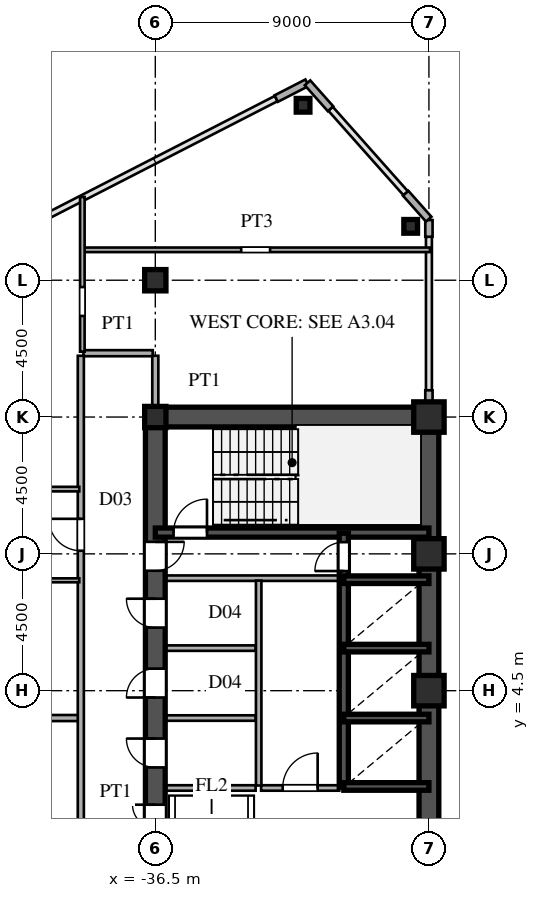
"""IFC4 building model, lengths in metres.
Left out: names, types, materials, properties, quantities, classifications, styles, units other than length and angle.
Written with IfcOpenShell. Run it as: python <this file> out.ifc"""

import sys

from ifc_helpers import new_model, si_unit, direction, frame, frame_2d, origin, origin_2d, place, context, subcontext, project, spatial, rectangle, hollow_rectangle, i_section, extrude, source, transform, mapped, element, fill, save


model = new_model("IFC4")
c1 = context("Model", 3, precision=1e-05, world=origin(), true_north=direction((0.0, 1.0)))
c2 = subcontext(c1, "Body", "Model", "MODEL_VIEW")
j1 = project(units=[si_unit("LENGTHUNIT", "METRE"), si_unit("PLANEANGLEUNIT", "RADIAN")], contexts=[c1])
p1 = place(None, origin())
s1 = spatial("IfcSite", under=j1, at=p1, CompositionType="ELEMENT")
p2 = place(p1, origin())
s2 = spatial("IfcBuilding", under=s1, at=p2, CompositionType="ELEMENT")
p3 = place(p2, frame((0.0, 0.0, 124.8)))
s3 = spatial("IfcBuildingStorey", under=s2, at=p3, CompositionType="ELEMENT", Elevation=124.8)
m1 = source(origin(), c2, "Body", "SweptSolid", [
    extrude(hollow_rectangle(XDim=1.0, YDim=1.0, WallThickness=0.042, at=origin_2d()), origin(), (0.0, 0.0, 1.0), 3.6),
])
for number, where, z_axis, x_axis in (
    (1, (-27.5, 4.5, 0.0), (0.0, 0.0, 1.0), (1.0, 0.0, 0.0)),
    (2, (-27.5, 9.0, 0.0), (0.0, 0.0, 1.0), (1.0, 0.0, 0.0)),
    (3, (-27.5, 13.5, 0.0), (0.0, 0.0, 1.0), (1.0, 0.0, 0.0)),
):
    element("IfcColumn", number, at=place(p3, frame(where, z_axis=z_axis, x_axis=x_axis)), inside=s3, PredefinedType="COLUMN", context=c2, shape_type="MappedRepresentation", body=[
        mapped(m1, transform((0.0, 0.0, 0.0), scale=1.0)),
    ])
m2 = source(origin(), c2, "Body", "SweptSolid", [
    extrude(i_section(OverallWidth=0.7, OverallDepth=0.7, WebThickness=0.028, FlangeThickness=0.045, at=origin_2d()), origin(), (0.0, 0.0, 1.0), 3.6),
])
for number, where, z_axis, x_axis in (
    (4, (-36.5, 13.5, 0.0), (0.0, 0.0, 1.0), (1.0, 0.0, 0.0)),
    (5, (-36.5, 18.0, 0.0), (0.0, 0.0, 1.0), (1.0, 0.0, 0.0)),
):
    element("IfcColumn", number, at=place(p3, frame(where, z_axis=z_axis, x_axis=x_axis)), inside=s3, PredefinedType="COLUMN", context=c2, shape_type="MappedRepresentation", body=[
        mapped(m2, transform((0.0, 0.0, 0.0), scale=1.0)),
    ])
m3 = source(origin(), c2, "Body", "SweptSolid", [
    extrude(hollow_rectangle(XDim=0.45, YDim=0.45, WallThickness=0.018, at=origin_2d()), origin(), (0.0, 0.0, 1.0), 3.6),
])
for number, where, z_axis, x_axis in (
    (6, (-28.1, 19.772, 0.0), (0.0, 0.0, 1.0), (1.0, 0.0, 0.0)),
    (7, (-31.64, 23.754, 0.0), (0.0, 0.0, 1.0), (1.0, 0.0, 0.0)),
):
    element("IfcColumn", number, at=place(p3, frame(where, z_axis=z_axis, x_axis=x_axis)), inside=s3, PredefinedType="COLUMN", context=c2, shape_type="MappedRepresentation", body=[
        mapped(m3, transform((0.0, 0.0, 0.0), scale=1.0)),
    ])
p4 = place(p3, frame((-27.5, 13.83, 0.0), z_axis=(0.0, 0.0, 1.0), x_axis=(0.0, 1.0, 0.0)))
e8 = element("IfcWall", 8, at=p4, inside=s3, PredefinedType="SOLIDWALL", context=c2, shape_type="SweptSolid", body=[
    extrude(rectangle(XDim=0.55, YDim=0.24, at=frame_2d((0.275, 0.0))), origin(), (0.0, 0.0, 1.0), 2.88),
])
p5 = place(p3, frame((-27.5, 19.43, 0.0), z_axis=(0.0, 0.0, 1.0), x_axis=(0.0, 1.0, 0.0)))
e9 = element("IfcWall", 9, at=p5, inside=s3, PredefinedType="SOLIDWALL", context=c2, shape_type="SweptSolid", body=[
    extrude(rectangle(XDim=0.55, YDim=0.24, at=frame_2d((0.275, 0.0))), origin(), (0.0, 0.0, 1.0), 3.38),
])
for number, where, z_axis, x_axis in (
    (10, (-27.507, 20.008, 0.0), (0.0, 0.0, 1.0), (-0.664, 0.747, 0.0)),
    (11, (-30.736, 23.64, 0.0), (0.0, 0.0, 1.0), (-0.664, 0.747, 0.0)),
):
    element("IfcWall", number, at=place(p3, frame(where, z_axis=z_axis, x_axis=x_axis)), inside=s3, PredefinedType="SOLIDWALL", context=c2, shape_type="SweptSolid", body=[
        extrude(rectangle(XDim=1.14, YDim=0.24, at=frame_2d((0.57, 0.0))), origin(), (0.0, 0.0, 1.0), 3.38),
    ])
p6 = place(p3, frame((-31.509, 24.495, 0.0), z_axis=(0.0, 0.0, 1.0), x_axis=(-0.889797395748, -0.456355776255, 0.0)))
e12 = element("IfcWall", 12, at=p6, inside=s3, PredefinedType="SOLIDWALL", context=c2, shape_type="SweptSolid", body=[
    extrude(rectangle(XDim=1.14, YDim=0.24, at=frame_2d((0.57, 0.0))), origin(), (0.0, 0.0, 1.0), 3.38),
])
p7 = place(p3, frame((-27.5, 1.3, 0.0), z_axis=(0.0, 0.0, 1.0), x_axis=(0.0, 1.0, 0.0)))
e13 = element("IfcWall", 13, at=p7, inside=s3, PredefinedType="SHEAR", context=c2, shape_type="SweptSolid", body=[
    extrude(rectangle(XDim=12.2, YDim=0.65, at=frame_2d((6.1, 0.0))), origin(), (0.0, 0.0, 1.0), 3.38),
])
p8 = place(p3, frame((-27.5, -1.3, 0.0), z_axis=(0.0, 0.0, 1.0), x_axis=(0.0, 1.0, 0.0)))
e14 = element("IfcWall", 14, at=p8, inside=s3, PredefinedType="SHEAR", context=c2, shape_type="SweptSolid", body=[
    extrude(rectangle(XDim=2.6, YDim=0.65, at=frame_2d((1.3, 0.0))), origin(), (0.0, 0.0, 1.0), 3.38),
])
p9 = place(p3, frame((-36.5, 13.5, 0.0), z_axis=(0.0, 0.0, 1.0), x_axis=(1.0, 0.0, 0.0)))
e15 = element("IfcWall", 15, at=p9, inside=s3, PredefinedType="SHEAR", context=c2, shape_type="SweptSolid", body=[
    extrude(rectangle(XDim=9.0, YDim=0.65, at=frame_2d((4.5, 0.0))), origin(), (0.0, 0.0, 1.0), 3.38),
])
p10 = place(p3, frame((-36.5, -1.3, 0.0), z_axis=(0.0, 0.0, 1.0), x_axis=(0.0, 1.0, 0.0)))
e16 = element("IfcWall", 16, at=p10, inside=s3, PredefinedType="SHEAR", context=c2, shape_type="SweptSolid", body=[
    extrude(rectangle(XDim=2.6, YDim=0.65, at=frame_2d((1.3, 0.0))), origin(), (0.0, 0.0, 1.0), 3.38),
])
p11 = place(p10, frame((0.55, 0.0, 0.0)))
e17 = element("IfcOpeningElement", 17, at=p11, cuts=e16, PredefinedType="OPENING", context=c2, shape_type="SweptSolid", body=[
    extrude(rectangle(XDim=1.5, YDim=2.3, at=frame_2d((0.75, 1.15))), frame((0.0, 0.335, 0.0), z_axis=(0.0, -1.0, 0.0), x_axis=(1.0, 0.0, 0.0)), (0.0, 0.0, 1.0), 0.67),
])
p12 = place(p3, frame((-36.5, 8.2, 0.0), z_axis=(0.0, 0.0, 1.0), x_axis=(0.0, 1.0, 0.0)))
e18 = element("IfcWall", 18, at=p12, inside=s3, PredefinedType="SHEAR", context=c2, shape_type="SweptSolid", body=[
    extrude(rectangle(XDim=5.45, YDim=0.65, at=frame_2d((2.725, 0.0))), origin(), (0.0, 0.0, 1.0), 3.38),
])
p13 = place(p12, frame((0.245, 0.0, 0.0)))
e19 = element("IfcOpeningElement", 19, at=p13, cuts=e18, PredefinedType="OPENING", context=c2, shape_type="SweptSolid", body=[
    extrude(rectangle(XDim=0.95, YDim=2.15, at=frame_2d((0.475, 1.075))), frame((0.0, 0.335, 0.0), z_axis=(0.0, -1.0, 0.0), x_axis=(1.0, 0.0, 0.0)), (0.0, 0.0, 1.0), 0.67),
])
p14 = place(p3, frame((-36.5, 1.3, 0.0), z_axis=(0.0, 0.0, 1.0), x_axis=(0.0, 1.0, 0.0)))
e20 = element("IfcWall", 20, at=p14, inside=s3, PredefinedType="SHEAR", context=c2, shape_type="SweptSolid", body=[
    extrude(rectangle(XDim=2.3, YDim=0.65, at=frame_2d((1.15, 0.0))), origin(), (0.0, 0.0, 1.0), 3.38),
])
p15 = place(p14, frame((0.675, 0.0, 0.0)))
e21 = element("IfcOpeningElement", 21, at=p15, cuts=e20, PredefinedType="OPENING", context=c2, shape_type="SweptSolid", body=[
    extrude(rectangle(XDim=0.95, YDim=2.15, at=frame_2d((0.475, 1.075))), frame((0.0, 0.335, 0.0), z_axis=(0.0, -1.0, 0.0), x_axis=(1.0, 0.0, 0.0)), (0.0, 0.0, 1.0), 0.67),
])
p16 = place(p3, frame((-36.5, 3.6, 0.0), z_axis=(0.0, 0.0, 1.0), x_axis=(0.0, 1.0, 0.0)))
e22 = element("IfcWall", 22, at=p16, inside=s3, PredefinedType="SHEAR", context=c2, shape_type="SweptSolid", body=[
    extrude(rectangle(XDim=2.3, YDim=0.65, at=frame_2d((1.15, 0.0))), origin(), (0.0, 0.0, 1.0), 3.38),
])
p17 = place(p16, frame((0.675, 0.0, 0.0)))
e23 = element("IfcOpeningElement", 23, at=p17, cuts=e22, PredefinedType="OPENING", context=c2, shape_type="SweptSolid", body=[
    extrude(rectangle(XDim=0.95, YDim=2.15, at=frame_2d((0.475, 1.075))), frame((0.0, 0.335, 0.0), z_axis=(0.0, -1.0, 0.0), x_axis=(1.0, 0.0, 0.0)), (0.0, 0.0, 1.0), 0.67),
])
p18 = place(p3, frame((-36.5, 5.9, 0.0), z_axis=(0.0, 0.0, 1.0), x_axis=(0.0, 1.0, 0.0)))
e24 = element("IfcWall", 24, at=p18, inside=s3, PredefinedType="SHEAR", context=c2, shape_type="SweptSolid", body=[
    extrude(rectangle(XDim=2.3, YDim=0.65, at=frame_2d((1.15, 0.0))), origin(), (0.0, 0.0, 1.0), 3.38),
])
p19 = place(p18, frame((0.675, 0.0, 0.0)))
e25 = element("IfcOpeningElement", 25, at=p19, cuts=e24, PredefinedType="OPENING", context=c2, shape_type="SweptSolid", body=[
    extrude(rectangle(XDim=0.95, YDim=2.15, at=frame_2d((0.475, 1.075))), frame((0.0, 0.335, 0.0), z_axis=(0.0, -1.0, 0.0), x_axis=(1.0, 0.0, 0.0)), (0.0, 0.0, 1.0), 0.67),
])
p20 = place(p3, frame((-36.5, 9.7, 0.0), z_axis=(0.0, 0.0, 1.0), x_axis=(1.0, 0.0, 0.0)))
e26 = element("IfcWall", 26, at=p20, inside=s3, PredefinedType="SHEAR", context=c2, shape_type="SweptSolid", body=[
    extrude(rectangle(XDim=9.0, YDim=0.3, at=frame_2d((4.5, 0.0))), origin(), (0.0, 0.0, 1.0), 3.38),
])
p21 = place(p20, frame((0.6, 0.0, 0.0)))
e27 = element("IfcOpeningElement", 27, at=p21, cuts=e26, PredefinedType="OPENING", context=c2, shape_type="SweptSolid", body=[
    extrude(rectangle(XDim=1.1, YDim=2.2, at=frame_2d((0.55, 1.1))), frame((0.0, 0.16, 0.0), z_axis=(0.0, -1.0, 0.0), x_axis=(1.0, 0.0, 0.0)), (0.0, 0.0, 1.0), 0.32),
])
for number, where, z_axis, x_axis in (
    (28, (-30.3, 1.35, 0.0), (0.0, 0.0, 1.0), (1.0, 0.0, 0.0)),
    (29, (-30.3, 3.6, 0.0), (0.0, 0.0, 1.0), (1.0, 0.0, 0.0)),
    (30, (-30.3, 5.9, 0.0), (0.0, 0.0, 1.0), (1.0, 0.0, 0.0)),
    (31, (-30.3, 8.15, 0.0), (0.0, 0.0, 1.0), (1.0, 0.0, 0.0)),
):
    element("IfcWall", number, at=place(p3, frame(where, z_axis=z_axis, x_axis=x_axis)), inside=s3, PredefinedType="SHEAR", context=c2, shape_type="SweptSolid", body=[
        extrude(rectangle(XDim=2.8, YDim=0.25, at=frame_2d((1.4, 0.0))), origin(), (0.0, 0.0, 1.0), 3.38),
    ])
p22 = place(p3, frame((-30.3, 1.32, 0.0), z_axis=(0.0, 0.0, 1.0), x_axis=(0.0, 1.0, 0.0)))
e32 = element("IfcWall", 32, at=p22, inside=s3, PredefinedType="SHEAR", context=c2, shape_type="SweptSolid", body=[
    extrude(rectangle(XDim=2.28, YDim=0.3, at=frame_2d((1.14, 0.0))), origin(), (0.0, 0.0, 1.0), 3.38),
])
p23 = place(p3, frame((-30.3, 3.6, 0.0), z_axis=(0.0, 0.0, 1.0), x_axis=(0.0, 1.0, 0.0)))
e33 = element("IfcWall", 33, at=p23, inside=s3, PredefinedType="SHEAR", context=c2, shape_type="SweptSolid", body=[
    extrude(rectangle(XDim=2.3, YDim=0.3, at=frame_2d((1.15, 0.0))), origin(), (0.0, 0.0, 1.0), 3.38),
])
p24 = place(p3, frame((-30.3, 5.9, 0.0), z_axis=(0.0, 0.0, 1.0), x_axis=(0.0, 1.0, 0.0)))
e34 = element("IfcWall", 34, at=p24, inside=s3, PredefinedType="SHEAR", context=c2, shape_type="SweptSolid", body=[
    extrude(rectangle(XDim=2.25, YDim=0.3, at=frame_2d((1.125, 0.0))), origin(), (0.0, 0.0, 1.0), 3.38),
])
p25 = place(p3, frame((-30.3, 8.15, 0.0), z_axis=(0.0, 0.0, 1.0), x_axis=(0.0, 1.0, 0.0)))
e35 = element("IfcWall", 35, at=p25, inside=s3, PredefinedType="SHEAR", context=c2, shape_type="SweptSolid", body=[
    extrude(rectangle(XDim=1.53, YDim=0.3, at=frame_2d((0.765, 0.0))), origin(), (0.0, 0.0, 1.0), 3.38),
])
p26 = place(p25, frame((0.285, 0.0, 0.0)))
e36 = element("IfcOpeningElement", 36, at=p26, cuts=e35, PredefinedType="OPENING", context=c2, shape_type="SweptSolid", body=[
    extrude(rectangle(XDim=0.95, YDim=2.15, at=frame_2d((0.475, 1.075))), frame((0.0, 0.16, 0.0), z_axis=(0.0, -1.0, 0.0), x_axis=(1.0, 0.0, 0.0)), (0.0, 0.0, 1.0), 0.32),
])
p27 = place(p3, frame((-36.15, 8.2, 0.0), z_axis=(0.0, 0.0, 1.0), x_axis=(1.0, 0.0, 0.0)))
e37 = element("IfcWall", 37, at=p27, inside=s3, PredefinedType="PARTITIONING", context=c2, shape_type="SweptSolid", body=[
    extrude(rectangle(XDim=5.7, YDim=0.18, at=frame_2d((2.85, 0.0))), origin(), (0.0, 0.0, 1.0), 3.38),
])
p28 = place(p3, frame((-33.1, 1.38, 0.0), z_axis=(0.0, 0.0, 1.0), x_axis=(0.0, 1.0, 0.0)))
e38 = element("IfcWall", 38, at=p28, inside=s3, PredefinedType="PARTITIONING", context=c2, shape_type="SweptSolid", body=[
    extrude(rectangle(XDim=6.74, YDim=0.18, at=frame_2d((3.37, 0.0))), origin(), (0.0, 0.0, 1.0), 3.38),
])
p29 = place(p3, frame((-33.02, 1.3, 0.0), z_axis=(0.0, 0.0, 1.0), x_axis=(1.0, 0.0, 0.0)))
e39 = element("IfcWall", 39, at=p29, inside=s3, PredefinedType="PARTITIONING", context=c2, shape_type="SweptSolid", body=[
    extrude(rectangle(XDim=2.57, YDim=0.18, at=frame_2d((1.285, 0.0))), origin(), (0.0, 0.0, 1.0), 3.38),
])
p30 = place(p29, frame((0.71, 0.0, 0.0)))
e40 = element("IfcOpeningElement", 40, at=p30, cuts=e39, PredefinedType="OPENING", context=c2, shape_type="SweptSolid", body=[
    extrude(rectangle(XDim=1.15, YDim=2.2, at=frame_2d((0.575, 1.1))), frame((0.0, 0.1, 0.0), z_axis=(0.0, -1.0, 0.0), x_axis=(1.0, 0.0, 0.0)), (0.0, 0.0, 1.0), 0.2),
])
for number, where, z_axis, x_axis in (
    (41, (-36.15, 1.3, 0.0), (0.0, 0.0, 1.0), (1.0, 0.0, 0.0)),
    (42, (-36.15, 3.6, 0.0), (0.0, 0.0, 1.0), (1.0, 0.0, 0.0)),
    (43, (-36.15, 5.9, 0.0), (0.0, 0.0, 1.0), (1.0, 0.0, 0.0)),
):
    element("IfcWall", number, at=place(p3, frame(where, z_axis=z_axis, x_axis=x_axis)), inside=s3, PredefinedType="PARTITIONING", context=c2, shape_type="SweptSolid", body=[
        extrude(rectangle(XDim=2.95, YDim=0.18, at=frame_2d((1.475, 0.0))), origin(), (0.0, 0.0, 1.0), 3.38),
    ])
p31 = place(p3, frame((-69.505, 3.6, 0.0), z_axis=(0.0, 0.0, 1.0), x_axis=(1.0, 0.0, 0.0)))
e44 = element("IfcWall", 44, at=p31, inside=s3, PredefinedType="PARTITIONING", context=c2, shape_type="SweptSolid", body=[
    extrude(rectangle(XDim=30.475, YDim=0.2, at=frame_2d((15.237, 0.0))), origin(), (0.0, 0.0, 1.0), 3.38),
])
p32 = place(p3, frame((-42.35, 8.13, 0.0), z_axis=(0.0, 0.0, 1.0), x_axis=(1.0, 0.0, 0.0)))
e45 = element("IfcWall", 45, at=p32, inside=s3, PredefinedType="PARTITIONING", context=c2, shape_type="SweptSolid", body=[
    extrude(rectangle(XDim=3.35, YDim=0.13, at=frame_2d((1.675, 0.0))), origin(), (0.0, 0.0, 1.0), 3.38),
])
p33 = place(p32, frame((1.235, 0.0, 0.0)))
e46 = element("IfcOpeningElement", 46, at=p33, cuts=e45, PredefinedType="OPENING", context=c2, shape_type="SweptSolid", body=[
    extrude(rectangle(XDim=0.88, YDim=2.1, at=frame_2d((0.44, 1.05))), frame((0.0, 0.075, 0.0), z_axis=(0.0, -1.0, 0.0), x_axis=(1.0, 0.0, 0.0)), (0.0, 0.0, 1.0), 0.15),
])
p34 = place(p3, frame((-42.35, 11.13, 0.0), z_axis=(0.0, 0.0, 1.0), x_axis=(1.0, 0.0, 0.0)))
e47 = element("IfcWall", 47, at=p34, inside=s3, PredefinedType="PARTITIONING", context=c2, shape_type="SweptSolid", body=[
    extrude(rectangle(XDim=3.35, YDim=0.15, at=frame_2d((1.675, 0.0))), origin(), (0.0, 0.0, 1.0), 3.38),
])
p35 = place(p34, frame((1.2, 0.0, 0.0)))
e48 = element("IfcOpeningElement", 48, at=p35, cuts=e47, PredefinedType="OPENING", context=c2, shape_type="SweptSolid", body=[
    extrude(rectangle(XDim=0.95, YDim=2.15, at=frame_2d((0.475, 1.075))), frame((0.0, 0.085, 0.0), z_axis=(0.0, -1.0, 0.0), x_axis=(1.0, 0.0, 0.0)), (0.0, 0.0, 1.0), 0.17),
])
p36 = place(p3, frame((-38.865, 15.6, 0.0), z_axis=(0.0, 0.0, 1.0), x_axis=(1.0, 0.0, 0.0)))
e49 = element("IfcWall", 49, at=p36, inside=s3, PredefinedType="PARTITIONING", context=c2, shape_type="SweptSolid", body=[
    extrude(rectangle(XDim=2.28, YDim=0.2, at=frame_2d((1.14, 0.0))), origin(), (0.0, 0.0, 1.0), 3.38),
])
p37 = place(p3, frame((-38.85, 19.0, 0.0), z_axis=(0.0, 0.0, 1.0), x_axis=(1.0, 0.0, 0.0)))
e50 = element("IfcWall", 50, at=p37, inside=s3, PredefinedType="PARTITIONING", context=c2, shape_type="SweptSolid", body=[
    extrude(rectangle(XDim=11.385, YDim=0.15, at=frame_2d((5.692, 0.0))), origin(), (0.0, 0.0, 1.0), 3.38),
])
p38 = place(p37, frame((5.175, 0.0, 0.0)))
e51 = element("IfcOpeningElement", 51, at=p38, cuts=e50, PredefinedType="OPENING", context=c2, shape_type="SweptSolid", body=[
    extrude(rectangle(XDim=0.95, YDim=2.15, at=frame_2d((0.475, 1.075))), frame((0.0, 0.085, 0.0), z_axis=(0.0, -1.0, 0.0), x_axis=(1.0, 0.0, 0.0)), (0.0, 0.0, 1.0), 0.17),
])
p39 = place(p3, frame((-38.95, -15.515, 0.0), z_axis=(0.0, 0.0, 1.0), x_axis=(0.0, 1.0, 0.0)))
e52 = element("IfcWall", 52, at=p39, inside=s3, PredefinedType="PARTITIONING", context=c2, shape_type="SweptSolid", body=[
    extrude(rectangle(XDim=31.03, YDim=0.2, at=frame_2d((15.515, 0.0))), origin(), (0.0, 0.0, 1.0), 3.38),
])
p40 = place(p39, frame((1.99, 0.0, 0.0)))
e53 = element("IfcOpeningElement", 53, at=p40, cuts=e52, PredefinedType="OPENING", context=c2, shape_type="SweptSolid", body=[
    extrude(rectangle(XDim=1.05, YDim=2.25, at=frame_2d((0.525, 1.125))), frame((0.0, 0.11, 0.0), z_axis=(0.0, -1.0, 0.0), x_axis=(1.0, 0.0, 0.0)), (0.0, 0.0, 1.0), 0.22),
])
p41 = place(p39, frame((11.38, 0.0, 0.0)))
e54 = element("IfcOpeningElement", 54, at=p41, cuts=e52, PredefinedType="OPENING", context=c2, shape_type="SweptSolid", body=[
    extrude(rectangle(XDim=1.05, YDim=2.25, at=frame_2d((0.525, 1.125))), frame((0.0, 0.11, 0.0), z_axis=(0.0, -1.0, 0.0), x_axis=(1.0, 0.0, 0.0)), (0.0, 0.0, 1.0), 0.22),
])
p42 = place(p39, frame((24.617, 0.0, 0.0)))
e55 = element("IfcOpeningElement", 55, at=p42, cuts=e52, PredefinedType="OPENING", context=c2, shape_type="SweptSolid", body=[
    extrude(rectangle(XDim=1.05, YDim=2.25, at=frame_2d((0.525, 1.125))), frame((0.0, 0.11, 0.0), z_axis=(0.0, -1.0, 0.0), x_axis=(1.0, 0.0, 0.0)), (0.0, 0.0, 1.0), 0.22),
])
p43 = place(p3, frame((-38.9, 15.65, 0.0), z_axis=(0.0, 0.0, 1.0), x_axis=(0.0, 1.0, 0.0)))
e56 = element("IfcWall", 56, at=p43, inside=s3, PredefinedType="PARTITIONING", context=c2, shape_type="SweptSolid", body=[
    extrude(rectangle(XDim=5.088, YDim=0.15, at=frame_2d((2.544, 0.0))), origin(), (0.0, 0.0, 1.0), 3.38),
])
p44 = place(p43, frame((1.175, 0.0, 0.0)))
e57 = element("IfcOpeningElement", 57, at=p44, cuts=e56, PredefinedType="OPENING", context=c2, shape_type="SweptSolid", body=[
    extrude(rectangle(XDim=0.95, YDim=2.15, at=frame_2d((0.475, 1.075))), frame((0.0, 0.085, 0.0), z_axis=(0.0, -1.0, 0.0), x_axis=(1.0, 0.0, 0.0)), (0.0, 0.0, 1.0), 0.17),
])
p45 = place(p3, frame((-36.5, 13.83, 0.0), z_axis=(0.0, 0.0, 1.0), x_axis=(0.0, 1.0, 0.0)))
e58 = element("IfcWall", 58, at=p45, inside=s3, PredefinedType="PARTITIONING", context=c2, shape_type="SweptSolid", body=[
    extrude(rectangle(XDim=1.685, YDim=0.2, at=frame_2d((0.842, 0.0))), origin(), (0.0, 0.0, 1.0), 2.78),
])
m4 = source(origin(), c2, "Body", "SweptSolid", [
    extrude(rectangle(XDim=1.5, YDim=2.3, at=frame_2d((0.75, 1.15))), frame((0.0, 0.025, 0.0), z_axis=(0.0, -1.0, 0.0), x_axis=(1.0, 0.0, 0.0)), (0.0, 0.0, 1.0), 0.05),
])
p46 = place(p11, origin())
e59 = element("IfcDoor", 59, at=p46, inside=s3, OperationType="DOUBLE_SWING_LEFT", PredefinedType="DOOR", context=c2, shape_type="MappedRepresentation", body=[
    mapped(m4, transform((0.0, 0.0, 0.0), scale=1.0)),
])
fill(e17, e59)
m5 = source(origin(), c2, "Body", "SweptSolid", [
    extrude(rectangle(XDim=0.95, YDim=2.15, at=frame_2d((0.475, 1.075))), frame((0.0, 0.025, 0.0), z_axis=(0.0, -1.0, 0.0), x_axis=(1.0, 0.0, 0.0)), (0.0, 0.0, 1.0), 0.05),
])
p47 = place(p13, frame((0.95, 0.0, 0.0), z_axis=(0.0, 0.0, 1.0), x_axis=(-1.0, 0.0, 0.0)))
e60 = element("IfcDoor", 60, at=p47, inside=s3, OperationType="SINGLE_SWING_RIGHT", PredefinedType="DOOR", context=c2, shape_type="MappedRepresentation", body=[
    mapped(m5, transform((0.0, 0.0, 0.0), scale=1.0)),
])
fill(e19, e60)
p48 = place(p15, origin())
e61 = element("IfcDoor", 61, at=p48, inside=s3, OperationType="SINGLE_SWING_RIGHT", PredefinedType="DOOR", context=c2, shape_type="MappedRepresentation", body=[
    mapped(m5, transform((0.0, 0.0, 0.0), scale=1.0)),
])
fill(e21, e61)
p49 = place(p17, origin())
e62 = element("IfcDoor", 62, at=p49, inside=s3, OperationType="SINGLE_SWING_LEFT", PredefinedType="DOOR", context=c2, shape_type="MappedRepresentation", body=[
    mapped(m5, transform((0.0, 0.0, 0.0), scale=1.0)),
])
fill(e23, e62)
p50 = place(p19, origin())
e63 = element("IfcDoor", 63, at=p50, inside=s3, OperationType="SINGLE_SWING_RIGHT", PredefinedType="DOOR", context=c2, shape_type="MappedRepresentation", body=[
    mapped(m5, transform((0.0, 0.0, 0.0), scale=1.0)),
])
fill(e25, e63)
m6 = source(origin(), c2, "Body", "SweptSolid", [
    extrude(rectangle(XDim=1.1, YDim=2.2, at=frame_2d((0.55, 1.1))), frame((0.0, 0.025, 0.0), z_axis=(0.0, -1.0, 0.0), x_axis=(1.0, 0.0, 0.0)), (0.0, 0.0, 1.0), 0.05),
])
p51 = place(p21, origin())
e64 = element("IfcDoor", 64, at=p51, inside=s3, OperationType="SINGLE_SWING_RIGHT", PredefinedType="DOOR", context=c2, shape_type="MappedRepresentation", body=[
    mapped(m6, transform((0.0, 0.0, 0.0), scale=1.0)),
])
fill(e27, e64)
p52 = place(p26, origin())
e65 = element("IfcDoor", 65, at=p52, inside=s3, OperationType="SINGLE_SWING_LEFT", PredefinedType="DOOR", context=c2, shape_type="MappedRepresentation", body=[
    mapped(m5, transform((0.0, 0.0, 0.0), scale=1.0)),
])
fill(e36, e65)
m7 = source(origin(), c2, "Body", "SweptSolid", [
    extrude(rectangle(XDim=1.15, YDim=2.2, at=frame_2d((0.575, 1.1))), frame((0.0, 0.025, 0.0), z_axis=(0.0, -1.0, 0.0), x_axis=(1.0, 0.0, 0.0)), (0.0, 0.0, 1.0), 0.05),
])
p53 = place(p30, origin())
e66 = element("IfcDoor", 66, at=p53, inside=s3, OperationType="SINGLE_SWING_RIGHT", PredefinedType="DOOR", context=c2, shape_type="MappedRepresentation", body=[
    mapped(m7, transform((0.0, 0.0, 0.0), scale=1.0)),
])
fill(e40, e66)
m8 = source(origin(), c2, "Body", "SweptSolid", [
    extrude(rectangle(XDim=1.05, YDim=2.25, at=frame_2d((0.525, 1.125))), frame((0.0, 0.025, 0.0), z_axis=(0.0, -1.0, 0.0), x_axis=(1.0, 0.0, 0.0)), (0.0, 0.0, 1.0), 0.05),
])
p54 = place(p42, origin())
e67 = element("IfcDoor", 67, at=p54, inside=s3, OperationType="SINGLE_SWING_RIGHT", PredefinedType="DOOR", context=c2, shape_type="MappedRepresentation", body=[
    mapped(m8, transform((0.0, 0.0, 0.0), scale=1.0)),
])
fill(e55, e67)
save(model, sys.argv[1])
